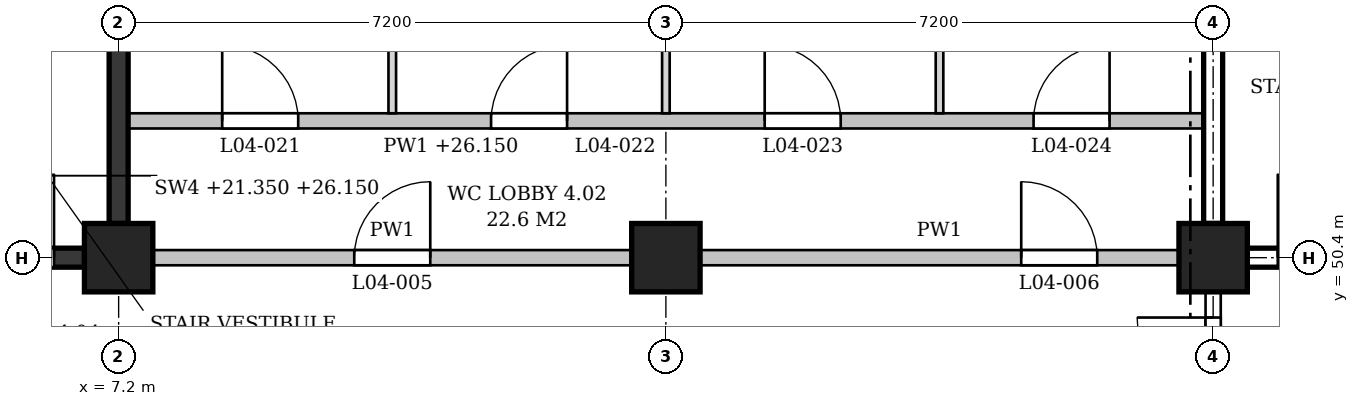
"""IFC4 building model, lengths in metres.
Left out: names, types, materials, properties, quantities, classifications, styles, units other than length and angle.
Written with IfcOpenShell. Run it as: python <this file> out.ifc"""

import sys

from ifc_helpers import new_model, si_unit, direction, frame, frame_2d, origin, origin_2d, place, context, subcontext, project, spatial, polyline, rectangle, outline, extrude, element, fill, save


model = new_model("IFC4")
c1 = context("Model", 3, precision=1e-05, world=origin(), true_north=direction((0.0, 1.0)))
c2 = subcontext(c1, "Body", "Model", "MODEL_VIEW")
j1 = project(units=[si_unit("LENGTHUNIT", "METRE"), si_unit("PLANEANGLEUNIT", "RADIAN")], contexts=[c1])
p1 = place(None, origin())
s1 = spatial("IfcSite", under=j1, at=p1, CompositionType="ELEMENT")
p2 = place(p1, origin())
s2 = spatial("IfcBuilding", under=s1, at=p2, CompositionType="ELEMENT")
p3 = place(p2, frame((0.0, 0.0, 21.6)))
s3 = spatial("IfcBuildingStorey", under=s2, at=p3, CompositionType="ELEMENT", Elevation=21.6)
for number, where, z_axis, x_axis in (
    (1, (7.2, 50.4, 0.0), (0.0, 0.0, 1.0), (1.0, 0.0, 0.0)),
    (2, (14.4, 50.4, 0.0), (0.0, 0.0, 1.0), (1.0, 0.0, 0.0)),
    (3, (21.6, 50.4, 0.0), (0.0, 0.0, 1.0), (1.0, 0.0, 0.0)),
):
    element("IfcColumn", number, at=place(p3, frame(where, z_axis=z_axis, x_axis=x_axis)), inside=s3, PredefinedType="COLUMN", context=c2, shape_type="SweptSolid", body=[
        extrude(rectangle(XDim=0.9, YDim=0.9, at=origin_2d()), origin(), (0.0, 0.0, 1.0), 4.8),
    ])
p4 = place(p3, frame((0.45, 50.4, 0.0), z_axis=(0.0, 0.0, 1.0), x_axis=(1.0, 0.0, 0.0)))
e4 = element("IfcWall", 4, at=p4, inside=s3, PredefinedType="SHEAR", context=c2, shape_type="SweptSolid", body=[
    extrude(rectangle(XDim=6.3, YDim=0.25, at=frame_2d((3.15, 0.0))), origin(), (0.0, 0.0, 1.0), 3.8),
])
p5 = place(p4, frame((4.8, 0.0, 0.0)))
e5 = element("IfcOpeningElement", 5, at=p5, cuts=e4, PredefinedType="OPENING", context=c2, shape_type="SweptSolid", body=[
    extrude(rectangle(XDim=1.1, YDim=2.1, at=frame_2d((0.55, 1.05))), frame((0.0, 0.135, 0.0), z_axis=(0.0, -1.0, 0.0), x_axis=(1.0, 0.0, 0.0)), (0.0, 0.0, 1.0), 0.27),
])
p6 = place(p3, frame((7.2, 50.85, 0.0), z_axis=(0.0, 0.0, 1.0), x_axis=(0.0, 1.0, 0.0)))
e6 = element("IfcWall", 6, at=p6, inside=s3, PredefinedType="SHEAR", context=c2, shape_type="SweptSolid", body=[
    extrude(rectangle(XDim=6.3, YDim=0.25, at=frame_2d((3.15, 0.0))), origin(), (0.0, 0.0, 1.0), 3.8),
])
p7 = place(p3, frame((22.05, 50.4, 0.0), z_axis=(0.0, 0.0, 1.0), x_axis=(1.0, 0.0, 0.0)))
e7 = element("IfcWall", 7, at=p7, inside=s3, PredefinedType="SHEAR", context=c2, shape_type="SweptSolid", body=[
    extrude(rectangle(XDim=6.3, YDim=0.25, at=frame_2d((3.15, 0.0))), origin(), (0.0, 0.0, 1.0), 3.8),
])
p8 = place(p7, frame((0.4, 0.0, 0.0)))
e8 = element("IfcOpeningElement", 8, at=p8, cuts=e7, PredefinedType="OPENING", context=c2, shape_type="SweptSolid", body=[
    extrude(rectangle(XDim=1.1, YDim=2.1, at=frame_2d((0.55, 1.05))), frame((0.0, 0.135, 0.0), z_axis=(0.0, -1.0, 0.0), x_axis=(1.0, 0.0, 0.0)), (0.0, 0.0, 1.0), 0.27),
])
p9 = place(p3, frame((21.6, 50.85, 0.0), z_axis=(0.0, 0.0, 1.0), x_axis=(0.0, 1.0, 0.0)))
e9 = element("IfcWall", 9, at=p9, inside=s3, PredefinedType="SHEAR", context=c2, shape_type="SweptSolid", body=[
    extrude(rectangle(XDim=6.3, YDim=0.25, at=frame_2d((3.15, 0.0))), origin(), (0.0, 0.0, 1.0), 3.8),
])
p10 = place(p3, frame((7.65, 50.4, 0.0), z_axis=(0.0, 0.0, 1.0), x_axis=(1.0, 0.0, 0.0)))
e10 = element("IfcWall", 10, at=p10, inside=s3, PredefinedType="PARTITIONING", context=c2, shape_type="SweptSolid", body=[
    extrude(rectangle(XDim=6.3, YDim=0.2, at=frame_2d((3.15, 0.0))), origin(), (0.0, 0.0, 1.0), 3.8),
])
p11 = place(p10, frame((2.65, 0.0, 0.0)))
e11 = element("IfcOpeningElement", 11, at=p11, cuts=e10, PredefinedType="OPENING", context=c2, shape_type="SweptSolid", body=[
    extrude(rectangle(XDim=1.0, YDim=2.1, at=frame_2d((0.5, 1.05))), frame((0.0, 0.11, 0.0), z_axis=(0.0, -1.0, 0.0), x_axis=(1.0, 0.0, 0.0)), (0.0, 0.0, 1.0), 0.22),
])
p12 = place(p3, frame((14.85, 50.4, 0.0), z_axis=(0.0, 0.0, 1.0), x_axis=(1.0, 0.0, 0.0)))
e12 = element("IfcWall", 12, at=p12, inside=s3, PredefinedType="PARTITIONING", context=c2, shape_type="SweptSolid", body=[
    extrude(rectangle(XDim=6.3, YDim=0.2, at=frame_2d((3.15, 0.0))), origin(), (0.0, 0.0, 1.0), 3.8),
])
p13 = place(p12, frame((4.225, 0.0, 0.0)))
e13 = element("IfcOpeningElement", 13, at=p13, cuts=e12, PredefinedType="OPENING", context=c2, shape_type="SweptSolid", body=[
    extrude(rectangle(XDim=1.0, YDim=2.1, at=frame_2d((0.5, 1.05))), frame((0.0, 0.11, 0.0), z_axis=(0.0, -1.0, 0.0), x_axis=(1.0, 0.0, 0.0)), (0.0, 0.0, 1.0), 0.22),
])
p14 = place(p3, frame((7.325, 52.2, 0.0), z_axis=(0.0, 0.0, 1.0), x_axis=(1.0, 0.0, 0.0)))
e14 = element("IfcWall", 14, at=p14, inside=s3, PredefinedType="PARTITIONING", context=c2, shape_type="SweptSolid", body=[
    extrude(outline(polyline([(0.0, 0.0), (14.15, 0.0), (14.15, 3.8), (14.025, 3.8), (14.025, 4.55), (7.325, 4.55), (7.325, 3.8), (6.825, 3.8), (6.825, 4.55), (0.125, 4.55), (0.125, 3.8), (0.0, 3.8), (0.0, 0.0)])), frame((0.0, 0.1, 0.0), z_axis=(0.0, -1.0, 0.0), x_axis=(1.0, 0.0, 0.0)), (0.0, 0.0, 1.0), 0.2),
])
p15 = place(p14, frame((1.238, 0.0, 0.0)))
e15 = element("IfcOpeningElement", 15, at=p15, cuts=e14, PredefinedType="OPENING", context=c2, shape_type="SweptSolid", body=[
    extrude(rectangle(XDim=1.0, YDim=2.1, at=frame_2d((0.5, 1.05))), frame((0.0, 0.11, 0.0), z_axis=(0.0, -1.0, 0.0), x_axis=(1.0, 0.0, 0.0)), (0.0, 0.0, 1.0), 0.22),
])
p16 = place(p14, frame((4.775, 0.0, 0.0)))
e16 = element("IfcOpeningElement", 16, at=p16, cuts=e14, PredefinedType="OPENING", context=c2, shape_type="SweptSolid", body=[
    extrude(rectangle(XDim=1.0, YDim=2.1, at=frame_2d((0.5, 1.05))), frame((0.0, 0.11, 0.0), z_axis=(0.0, -1.0, 0.0), x_axis=(1.0, 0.0, 0.0)), (0.0, 0.0, 1.0), 0.22),
])
p17 = place(p14, frame((8.375, 0.0, 0.0)))
e17 = element("IfcOpeningElement", 17, at=p17, cuts=e14, PredefinedType="OPENING", context=c2, shape_type="SweptSolid", body=[
    extrude(rectangle(XDim=1.0, YDim=2.1, at=frame_2d((0.5, 1.05))), frame((0.0, 0.11, 0.0), z_axis=(0.0, -1.0, 0.0), x_axis=(1.0, 0.0, 0.0)), (0.0, 0.0, 1.0), 0.22),
])
p18 = place(p14, frame((11.913, 0.0, 0.0)))
e18 = element("IfcOpeningElement", 18, at=p18, cuts=e14, PredefinedType="OPENING", context=c2, shape_type="SweptSolid", body=[
    extrude(rectangle(XDim=1.0, YDim=2.1, at=frame_2d((0.5, 1.05))), frame((0.0, 0.11, 0.0), z_axis=(0.0, -1.0, 0.0), x_axis=(1.0, 0.0, 0.0)), (0.0, 0.0, 1.0), 0.22),
])
p19 = place(p3, frame((10.8, 52.3, 0.0), z_axis=(0.0, 0.0, 1.0), x_axis=(0.0, 1.0, 0.0)))
e19 = element("IfcWall", 19, at=p19, inside=s3, PredefinedType="PARTITIONING", context=c2, shape_type="SweptSolid", body=[
    extrude(rectangle(XDim=5.15, YDim=0.1, at=frame_2d((2.575, 0.0))), origin(), (0.0, 0.0, 1.0), 3.8),
])
p20 = place(p3, frame((14.4, 52.3, 0.0), z_axis=(0.0, 0.0, 1.0), x_axis=(0.0, 1.0, 0.0)))
e20 = element("IfcWall", 20, at=p20, inside=s3, PredefinedType="PARTITIONING", context=c2, shape_type="SweptSolid", body=[
    extrude(rectangle(XDim=4.85, YDim=0.1, at=frame_2d((2.425, 0.0))), origin(), (0.0, 0.0, 1.0), 3.8),
])
p21 = place(p3, frame((18.0, 52.3, 0.0), z_axis=(0.0, 0.0, 1.0), x_axis=(0.0, 1.0, 0.0)))
e21 = element("IfcWall", 21, at=p21, inside=s3, PredefinedType="PARTITIONING", context=c2, shape_type="SweptSolid", body=[
    extrude(rectangle(XDim=5.15, YDim=0.1, at=frame_2d((2.575, 0.0))), origin(), (0.0, 0.0, 1.0), 3.8),
])
p22 = place(p3, frame((21.6, 47.275, 0.0), z_axis=(0.0, 0.0, 1.0), x_axis=(0.0, 1.0, 0.0)))
e22 = element("IfcWall", 22, at=p22, inside=s3, PredefinedType="PARTITIONING", context=c2, shape_type="SweptSolid", body=[
    extrude(rectangle(XDim=2.675, YDim=0.2, at=frame_2d((1.337, 0.0))), origin(), (0.0, 0.0, 1.0), 3.8),
])
p23 = place(p22, frame((0.337, 0.0, 0.0)))
e23 = element("IfcOpeningElement", 23, at=p23, cuts=e22, PredefinedType="OPENING", context=c2, shape_type="SweptSolid", body=[
    extrude(rectangle(XDim=2.0, YDim=2.4, at=frame_2d((1.0, 1.2))), frame((0.0, 0.11, 0.0), z_axis=(0.0, -1.0, 0.0), x_axis=(1.0, 0.0, 0.0)), (0.0, 0.0, 1.0), 0.22),
])
p24 = place(p5, origin())
e24 = element("IfcDoor", 24, at=p24, inside=s3, OperationType="SINGLE_SWING_RIGHT", PredefinedType="DOOR", context=c2, shape_type="SweptSolid", body=[
    extrude(rectangle(XDim=1.1, YDim=2.1, at=frame_2d((0.55, 1.05))), frame((0.0, 0.025, 0.0), z_axis=(0.0, -1.0, 0.0), x_axis=(1.0, 0.0, 0.0)), (0.0, 0.0, 1.0), 0.05),
])
fill(e5, e24)
p25 = place(p8, origin())
e25 = element("IfcDoor", 25, at=p25, inside=s3, OperationType="SINGLE_SWING_LEFT", PredefinedType="DOOR", context=c2, shape_type="SweptSolid", body=[
    extrude(rectangle(XDim=1.1, YDim=2.1, at=frame_2d((0.55, 1.05))), frame((0.0, 0.025, 0.0), z_axis=(0.0, -1.0, 0.0), x_axis=(1.0, 0.0, 0.0)), (0.0, 0.0, 1.0), 0.05),
])
fill(e8, e25)
p26 = place(p23, origin())
e26 = element("IfcDoor", 26, at=p26, inside=s3, OperationType="DOUBLE_DOOR_SINGLE_SWING", PredefinedType="DOOR", context=c2, shape_type="SweptSolid", body=[
    extrude(rectangle(XDim=2.0, YDim=2.4, at=frame_2d((1.0, 1.2))), frame((0.0, 0.025, 0.0), z_axis=(0.0, -1.0, 0.0), x_axis=(1.0, 0.0, 0.0)), (0.0, 0.0, 1.0), 0.05),
])
fill(e23, e26)
p27 = place(p11, origin())
e27 = element("IfcDoor", 27, at=p27, inside=s3, OperationType="SINGLE_SWING_RIGHT", PredefinedType="DOOR", context=c2, shape_type="SweptSolid", body=[
    extrude(rectangle(XDim=1.0, YDim=2.1, at=frame_2d((0.5, 1.05))), frame((0.0, 0.025, 0.0), z_axis=(0.0, -1.0, 0.0), x_axis=(1.0, 0.0, 0.0)), (0.0, 0.0, 1.0), 0.05),
])
fill(e11, e27)
p28 = place(p13, origin())
e28 = element("IfcDoor", 28, at=p28, inside=s3, OperationType="SINGLE_SWING_LEFT", PredefinedType="DOOR", context=c2, shape_type="SweptSolid", body=[
    extrude(rectangle(XDim=1.0, YDim=2.1, at=frame_2d((0.5, 1.05))), frame((0.0, 0.025, 0.0), z_axis=(0.0, -1.0, 0.0), x_axis=(1.0, 0.0, 0.0)), (0.0, 0.0, 1.0), 0.05),
])
fill(e13, e28)
p29 = place(p15, origin())
e29 = element("IfcDoor", 29, at=p29, inside=s3, OperationType="SINGLE_SWING_LEFT", PredefinedType="DOOR", context=c2, shape_type="SweptSolid", body=[
    extrude(rectangle(XDim=1.0, YDim=2.1, at=frame_2d((0.5, 1.05))), frame((0.0, 0.025, 0.0), z_axis=(0.0, -1.0, 0.0), x_axis=(1.0, 0.0, 0.0)), (0.0, 0.0, 1.0), 0.05),
])
fill(e15, e29)
p30 = place(p16, origin())
e30 = element("IfcDoor", 30, at=p30, inside=s3, OperationType="SINGLE_SWING_RIGHT", PredefinedType="DOOR", context=c2, shape_type="SweptSolid", body=[
    extrude(rectangle(XDim=1.0, YDim=2.1, at=frame_2d((0.5, 1.05))), frame((0.0, 0.025, 0.0), z_axis=(0.0, -1.0, 0.0), x_axis=(1.0, 0.0, 0.0)), (0.0, 0.0, 1.0), 0.05),
])
fill(e16, e30)
p31 = place(p17, origin())
e31 = element("IfcDoor", 31, at=p31, inside=s3, OperationType="SINGLE_SWING_LEFT", PredefinedType="DOOR", context=c2, shape_type="SweptSolid", body=[
    extrude(rectangle(XDim=1.0, YDim=2.1, at=frame_2d((0.5, 1.05))), frame((0.0, 0.025, 0.0), z_axis=(0.0, -1.0, 0.0), x_axis=(1.0, 0.0, 0.0)), (0.0, 0.0, 1.0), 0.05),
])
fill(e17, e31)
p32 = place(p18, origin())
e32 = element("IfcDoor", 32, at=p32, inside=s3, OperationType="SINGLE_SWING_RIGHT", PredefinedType="DOOR", context=c2, shape_type="SweptSolid", body=[
    extrude(rectangle(XDim=1.0, YDim=2.1, at=frame_2d((0.5, 1.05))), frame((0.0, 0.025, 0.0), z_axis=(0.0, -1.0, 0.0), x_axis=(1.0, 0.0, 0.0)), (0.0, 0.0, 1.0), 0.05),
])
fill(e18, e32)
save(model, sys.argv[1])
